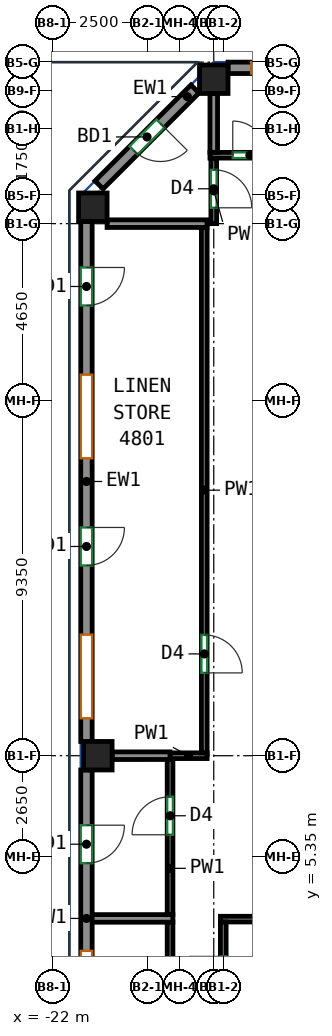
"""IFC4 building model, lengths in metres.
Left out: names, types, materials, properties, quantities, classifications, styles, units other than length and angle.
Written with IfcOpenShell. Run it as: python <this file> out.ifc"""

import sys

from ifc_helpers import new_model, si_unit, direction, frame, frame_2d, origin, origin_2d, place, context, subcontext, project, spatial, rectangle, extrude, source, transform, mapped, element, fill, save


model = new_model("IFC4")
c1 = context("Model", 3, precision=1e-05, world=origin(), true_north=direction((0.0, 1.0)))
c2 = subcontext(c1, "Body", "Model", "MODEL_VIEW")
j1 = project(units=[si_unit("LENGTHUNIT", "METRE"), si_unit("PLANEANGLEUNIT", "RADIAN")], contexts=[c1])
p1 = place(None, origin())
s1 = spatial("IfcSite", under=j1, at=p1, CompositionType="ELEMENT")
p2 = place(p1, origin())
s2 = spatial("IfcBuilding", under=s1, at=p2, CompositionType="ELEMENT")
p3 = place(p2, frame((0.0, 0.0, 199.9)))
s3 = spatial("IfcBuildingStorey", under=s2, at=p3, CompositionType="ELEMENT", Elevation=199.9)
m1 = source(origin(), c2, "Body", "SweptSolid", [
    extrude(rectangle(XDim=0.75, YDim=0.75, at=origin_2d()), origin(), (0.0, 0.0, 1.0), 3.12),
])
for number, where, z_axis, x_axis in (
    (1, (-20.932, 22.432, 0.0), (0.0, 0.0, 1.0), (1.0, 0.0, 0.0)),
    (2, (-20.8, 8.0, 0.0), (0.0, 0.0, 1.0), (1.0, 0.0, 0.0)),
    (3, (-17.75, 25.8, 0.0), (0.0, 0.0, 1.0), (1.0, 0.0, 0.0)),
):
    element("IfcColumn", number, at=place(p3, frame(where, z_axis=z_axis, x_axis=x_axis)), inside=s3, PredefinedType="COLUMN", context=c2, shape_type="MappedRepresentation", body=[
        mapped(m1, transform((0.0, 0.0, 0.0))),
    ])
m2 = source(origin(), c2, "Body", "SweptSolid", [
    extrude(rectangle(XDim=6.833, YDim=0.3, at=frame_2d((3.417, 0.0))), origin(), (0.0, 0.0, 1.0), 3.12),
])
p4 = place(p3, frame((-10.542, 26.1, 0.0), z_axis=(0.0, 0.0, 1.0), x_axis=(-1.0, 0.0, 0.0)))
e4 = element("IfcWall", 4, at=p4, inside=s3, PredefinedType="SOLIDWALL", context=c2, shape_type="MappedRepresentation", body=[
    mapped(m2, transform((0.0, 0.0, 0.0))),
])
p5 = place(p4, frame((0.608, 0.0, 0.85)))
e5 = element("IfcOpeningElement", 5, at=p5, cuts=e4, PredefinedType="OPENING", context=c2, shape_type="SweptSolid", body=[
    extrude(rectangle(XDim=2.2, YDim=1.95, at=frame_2d((1.1, 0.975))), frame((0.0, 0.16, 0.0), z_axis=(0.0, -1.0, 0.0), x_axis=(1.0, 0.0, 0.0)), (0.0, 0.0, 1.0), 0.32),
])
p6 = place(p4, frame((4.025, 0.0, 0.85)))
e6 = element("IfcOpeningElement", 6, at=p6, cuts=e4, PredefinedType="OPENING", context=c2, shape_type="SweptSolid", body=[
    extrude(rectangle(XDim=2.2, YDim=1.95, at=frame_2d((1.1, 0.975))), frame((0.0, 0.16, 0.0), z_axis=(0.0, -1.0, 0.0), x_axis=(1.0, 0.0, 0.0)), (0.0, 0.0, 1.0), 0.32),
])
m3 = source(origin(), c2, "Body", "SweptSolid", [
    extrude(rectangle(XDim=3.571, YDim=0.3, at=frame_2d((1.786, 0.0))), origin(), (0.0, 0.0, 1.0), 3.12),
])
p7 = place(p3, frame((-18.244, 25.544, 0.0), z_axis=(0.0, 0.0, 1.0), x_axis=(-0.707072595841, -0.707140964879, 0.0)))
e7 = element("IfcWall", 7, at=p7, inside=s3, PredefinedType="SOLIDWALL", context=c2, shape_type="MappedRepresentation", body=[
    mapped(m3, transform((0.0, 0.0, 0.0))),
])
p8 = place(p7, frame((1.285, 0.0, 0.0)))
e8 = element("IfcOpeningElement", 8, at=p8, cuts=e7, PredefinedType="OPENING", context=c2, shape_type="SweptSolid", body=[
    extrude(rectangle(XDim=1.0, YDim=2.1, at=frame_2d((0.5, 1.05))), frame((0.0, 0.16, 0.0), z_axis=(0.0, -1.0, 0.0), x_axis=(1.0, 0.0, 0.0)), (0.0, 0.0, 1.0), 0.32),
])
m4 = source(origin(), c2, "Body", "SweptSolid", [
    extrude(rectangle(XDim=13.682, YDim=0.3, at=frame_2d((6.841, 0.0))), origin(), (0.0, 0.0, 1.0), 3.12),
])
p9 = place(p3, frame((-21.1, 22.057, 0.0), z_axis=(0.0, 0.0, 1.0), x_axis=(0.0, -1.0, 0.0)))
e9 = element("IfcWall", 9, at=p9, inside=s3, PredefinedType="SOLIDWALL", context=c2, shape_type="MappedRepresentation", body=[
    mapped(m4, transform((0.0, 0.0, 0.0))),
])
p10 = place(p9, frame((1.21, 0.0, 0.0)))
e10 = element("IfcOpeningElement", 10, at=p10, cuts=e9, PredefinedType="OPENING", context=c2, shape_type="SweptSolid", body=[
    extrude(rectangle(XDim=1.0, YDim=2.1, at=frame_2d((0.5, 1.05))), frame((0.0, 0.16, 0.0), z_axis=(0.0, -1.0, 0.0), x_axis=(1.0, 0.0, 0.0)), (0.0, 0.0, 1.0), 0.32),
])
p11 = place(p9, frame((4.031, 0.0, 0.85)))
e11 = element("IfcOpeningElement", 11, at=p11, cuts=e9, PredefinedType="OPENING", context=c2, shape_type="SweptSolid", body=[
    extrude(rectangle(XDim=2.2, YDim=1.95, at=frame_2d((1.1, 0.975))), frame((0.0, 0.16, 0.0), z_axis=(0.0, -1.0, 0.0), x_axis=(1.0, 0.0, 0.0)), (0.0, 0.0, 1.0), 0.32),
])
p12 = place(p9, frame((8.051, 0.0, 0.0)))
e12 = element("IfcOpeningElement", 12, at=p12, cuts=e9, PredefinedType="OPENING", context=c2, shape_type="SweptSolid", body=[
    extrude(rectangle(XDim=1.0, YDim=2.1, at=frame_2d((0.5, 1.05))), frame((0.0, 0.16, 0.0), z_axis=(0.0, -1.0, 0.0), x_axis=(1.0, 0.0, 0.0)), (0.0, 0.0, 1.0), 0.32),
])
p13 = place(p9, frame((10.872, 0.0, 0.85)))
e13 = element("IfcOpeningElement", 13, at=p13, cuts=e9, PredefinedType="OPENING", context=c2, shape_type="SweptSolid", body=[
    extrude(rectangle(XDim=2.2, YDim=1.95, at=frame_2d((1.1, 0.975))), frame((0.0, 0.16, 0.0), z_axis=(0.0, -1.0, 0.0), x_axis=(1.0, 0.0, 0.0)), (0.0, 0.0, 1.0), 0.32),
])
m5 = source(origin(), c2, "Body", "SweptSolid", [
    extrude(rectangle(XDim=7.812, YDim=0.3, at=frame_2d((3.906, 0.0))), origin(), (0.0, 0.0, 1.0), 3.12),
])
p14 = place(p3, frame((-21.1, 7.625, 0.0), z_axis=(0.0, 0.0, 1.0), x_axis=(0.0, -1.0, 0.0)))
e14 = element("IfcWall", 14, at=p14, inside=s3, PredefinedType="SOLIDWALL", context=c2, shape_type="MappedRepresentation", body=[
    mapped(m5, transform((0.0, 0.0, 0.0))),
])
p15 = place(p14, frame((1.453, 0.0, 0.0)))
e15 = element("IfcOpeningElement", 15, at=p15, cuts=e14, PredefinedType="OPENING", context=c2, shape_type="SweptSolid", body=[
    extrude(rectangle(XDim=1.0, YDim=2.1, at=frame_2d((0.5, 1.05))), frame((0.0, 0.16, 0.0), z_axis=(0.0, -1.0, 0.0), x_axis=(1.0, 0.0, 0.0)), (0.0, 0.0, 1.0), 0.32),
])
p16 = place(p14, frame((4.759, 0.0, 0.85)))
e16 = element("IfcOpeningElement", 16, at=p16, cuts=e14, PredefinedType="OPENING", context=c2, shape_type="SweptSolid", body=[
    extrude(rectangle(XDim=2.2, YDim=1.95, at=frame_2d((1.1, 0.975))), frame((0.0, 0.16, 0.0), z_axis=(0.0, -1.0, 0.0), x_axis=(1.0, 0.0, 0.0)), (0.0, 0.0, 1.0), 0.32),
])
p17 = place(p3, frame((-17.925, 8.0, 0.0), z_axis=(0.0, 0.0, 1.0), x_axis=(-1.0, 0.0, 0.0)))
e17 = element("IfcWall", 17, at=p17, inside=s3, PredefinedType="PARTITIONING", context=c2, shape_type="SweptSolid", body=[
    extrude(rectangle(XDim=0.976, YDim=0.15, at=frame_2d((0.488, 0.0))), origin(), (0.0, 0.0, 1.0), 3.12),
])
p18 = place(p3, frame((-18.0, 21.9, 0.0), z_axis=(0.0, 0.0, 1.0), x_axis=(0.0, -1.0, 0.0)))
e18 = element("IfcWall", 18, at=p18, inside=s3, PredefinedType="PARTITIONING", context=c2, shape_type="SweptSolid", body=[
    extrude(rectangle(XDim=13.825, YDim=0.15, at=frame_2d((6.913, 0.0))), origin(), (0.0, 0.0, 1.0), 3.12),
])
p19 = place(p18, frame((10.721, 0.0, 0.0)))
e19 = element("IfcOpeningElement", 19, at=p19, cuts=e18, PredefinedType="OPENING", context=c2, shape_type="SweptSolid", body=[
    extrude(rectangle(XDim=1.0, YDim=2.1, at=frame_2d((0.5, 1.05))), frame((0.0, 0.085, 0.0), z_axis=(0.0, -1.0, 0.0), x_axis=(1.0, 0.0, 0.0)), (0.0, 0.0, 1.0), 0.17),
])
p20 = place(p3, frame((-18.9, -0.472, 0.0), z_axis=(0.0, 0.0, 1.0), x_axis=(0.0, 1.0, 0.0)))
e20 = element("IfcWall", 20, at=p20, inside=s3, PredefinedType="PARTITIONING", context=c2, shape_type="SweptSolid", body=[
    extrude(rectangle(XDim=4.101, YDim=0.15, at=frame_2d((2.05, 0.0))), origin(), (0.0, 0.0, 1.0), 3.12),
])
p21 = place(p20, frame((2.001, 0.0, 0.0)))
e21 = element("IfcOpeningElement", 21, at=p21, cuts=e20, PredefinedType="OPENING", context=c2, shape_type="SweptSolid", body=[
    extrude(rectangle(XDim=1.0, YDim=2.1, at=frame_2d((0.5, 1.05))), frame((0.0, 0.085, 0.0), z_axis=(0.0, -1.0, 0.0), x_axis=(1.0, 0.0, 0.0)), (0.0, 0.0, 1.0), 0.17),
])
p22 = place(p3, frame((-18.9, 3.809, 0.0), z_axis=(0.0, 0.0, 1.0), x_axis=(0.0, 1.0, 0.0)))
e22 = element("IfcWall", 22, at=p22, inside=s3, PredefinedType="PARTITIONING", context=c2, shape_type="SweptSolid", body=[
    extrude(rectangle(XDim=4.092, YDim=0.15, at=frame_2d((2.046, 0.0))), origin(), (0.0, 0.0, 1.0), 3.12),
])
p23 = place(p22, frame((2.111, 0.0, 0.0)))
e23 = element("IfcOpeningElement", 23, at=p23, cuts=e22, PredefinedType="OPENING", context=c2, shape_type="SweptSolid", body=[
    extrude(rectangle(XDim=1.0, YDim=2.1, at=frame_2d((0.5, 1.05))), frame((0.0, 0.085, 0.0), z_axis=(0.0, -1.0, 0.0), x_axis=(1.0, 0.0, 0.0)), (0.0, 0.0, 1.0), 0.17),
])
p24 = place(p3, frame((-17.75, 23.725, 0.0), z_axis=(0.0, 0.0, 1.0), x_axis=(0.0, -1.0, 0.0)))
e24 = element("IfcWall", 24, at=p24, inside=s3, PredefinedType="PARTITIONING", context=c2, shape_type="SweptSolid", body=[
    extrude(rectangle(XDim=1.725, YDim=0.15, at=frame_2d((0.863, 0.0))), origin(), (0.0, 0.0, 1.0), 3.12),
])
p25 = place(p24, frame((0.308, 0.0, 0.0)))
e25 = element("IfcOpeningElement", 25, at=p25, cuts=e24, PredefinedType="OPENING", context=c2, shape_type="SweptSolid", body=[
    extrude(rectangle(XDim=1.0, YDim=2.1, at=frame_2d((0.5, 1.05))), frame((0.0, 0.085, 0.0), z_axis=(0.0, -1.0, 0.0), x_axis=(1.0, 0.0, 0.0)), (0.0, 0.0, 1.0), 0.17),
])
p26 = place(p3, frame((-17.85, 23.8, 0.0), z_axis=(0.0, 0.0, 1.0), x_axis=(1.0, 0.0, 0.0)))
e26 = element("IfcWall", 26, at=p26, inside=s3, PredefinedType="PARTITIONING", context=c2, shape_type="SweptSolid", body=[
    extrude(rectangle(XDim=45.7, YDim=0.15, at=frame_2d((22.85, 0.0))), origin(), (0.0, 0.0, 1.0), 3.12),
])
p27 = place(p26, frame((0.6, 0.0, 0.0)))
e27 = element("IfcOpeningElement", 27, at=p27, cuts=e26, PredefinedType="OPENING", context=c2, shape_type="SweptSolid", body=[
    extrude(rectangle(XDim=0.9, YDim=2.1, at=frame_2d((0.45, 1.05))), frame((0.0, 0.085, 0.0), z_axis=(0.0, -1.0, 0.0), x_axis=(1.0, 0.0, 0.0)), (0.0, 0.0, 1.0), 0.17),
])
p28 = place(p26, frame((4.081, 0.0, 0.0)))
e28 = element("IfcOpeningElement", 28, at=p28, cuts=e26, PredefinedType="OPENING", context=c2, shape_type="SweptSolid", body=[
    extrude(rectangle(XDim=1.0, YDim=2.1, at=frame_2d((0.5, 1.05))), frame((0.0, 0.085, 0.0), z_axis=(0.0, -1.0, 0.0), x_axis=(1.0, 0.0, 0.0)), (0.0, 0.0, 1.0), 0.17),
])
p29 = place(p26, frame((9.481, 0.0, 0.0)))
e29 = element("IfcOpeningElement", 29, at=p29, cuts=e26, PredefinedType="OPENING", context=c2, shape_type="SweptSolid", body=[
    extrude(rectangle(XDim=0.9, YDim=2.1, at=frame_2d((0.45, 1.05))), frame((0.0, 0.085, 0.0), z_axis=(0.0, -1.0, 0.0), x_axis=(1.0, 0.0, 0.0)), (0.0, 0.0, 1.0), 0.17),
])
p30 = place(p26, frame((12.803, 0.0, 0.0)))
e30 = element("IfcOpeningElement", 30, at=p30, cuts=e26, PredefinedType="OPENING", context=c2, shape_type="SweptSolid", body=[
    extrude(rectangle(XDim=1.0, YDim=2.1, at=frame_2d((0.5, 1.05))), frame((0.0, 0.085, 0.0), z_axis=(0.0, -1.0, 0.0), x_axis=(1.0, 0.0, 0.0)), (0.0, 0.0, 1.0), 0.17),
])
p31 = place(p26, frame((15.489, 0.0, 0.0)))
e31 = element("IfcOpeningElement", 31, at=p31, cuts=e26, PredefinedType="OPENING", context=c2, shape_type="SweptSolid", body=[
    extrude(rectangle(XDim=0.9, YDim=2.1, at=frame_2d((0.45, 1.05))), frame((0.0, 0.085, 0.0), z_axis=(0.0, -1.0, 0.0), x_axis=(1.0, 0.0, 0.0)), (0.0, 0.0, 1.0), 0.17),
])
p32 = place(p26, frame((21.244, 0.0, 0.0)))
e32 = element("IfcOpeningElement", 32, at=p32, cuts=e26, PredefinedType="OPENING", context=c2, shape_type="SweptSolid", body=[
    extrude(rectangle(XDim=0.9, YDim=2.1, at=frame_2d((0.45, 1.05))), frame((0.0, 0.085, 0.0), z_axis=(0.0, -1.0, 0.0), x_axis=(1.0, 0.0, 0.0)), (0.0, 0.0, 1.0), 0.17),
])
p33 = place(p26, frame((23.542, 0.0, 0.0)))
e33 = element("IfcOpeningElement", 33, at=p33, cuts=e26, PredefinedType="OPENING", context=c2, shape_type="SweptSolid", body=[
    extrude(rectangle(XDim=1.0, YDim=2.1, at=frame_2d((0.5, 1.05))), frame((0.0, 0.085, 0.0), z_axis=(0.0, -1.0, 0.0), x_axis=(1.0, 0.0, 0.0)), (0.0, 0.0, 1.0), 0.17),
])
p34 = place(p26, frame((28.841, 0.0, 0.0)))
e34 = element("IfcOpeningElement", 34, at=p34, cuts=e26, PredefinedType="OPENING", context=c2, shape_type="SweptSolid", body=[
    extrude(rectangle(XDim=0.9, YDim=2.1, at=frame_2d((0.45, 1.05))), frame((0.0, 0.085, 0.0), z_axis=(0.0, -1.0, 0.0), x_axis=(1.0, 0.0, 0.0)), (0.0, 0.0, 1.0), 0.17),
])
p35 = place(p26, frame((32.331, 0.0, 0.0)))
e35 = element("IfcOpeningElement", 35, at=p35, cuts=e26, PredefinedType="OPENING", context=c2, shape_type="SweptSolid", body=[
    extrude(rectangle(XDim=1.0, YDim=2.1, at=frame_2d((0.5, 1.05))), frame((0.0, 0.085, 0.0), z_axis=(0.0, -1.0, 0.0), x_axis=(1.0, 0.0, 0.0)), (0.0, 0.0, 1.0), 0.17),
])
p36 = place(p26, frame((35.42, 0.0, 0.0)))
e36 = element("IfcOpeningElement", 36, at=p36, cuts=e26, PredefinedType="OPENING", context=c2, shape_type="SweptSolid", body=[
    extrude(rectangle(XDim=0.9, YDim=2.1, at=frame_2d((0.45, 1.05))), frame((0.0, 0.085, 0.0), z_axis=(0.0, -1.0, 0.0), x_axis=(1.0, 0.0, 0.0)), (0.0, 0.0, 1.0), 0.17),
])
p37 = place(p26, frame((40.317, 0.0, 0.0)))
e37 = element("IfcOpeningElement", 37, at=p37, cuts=e26, PredefinedType="OPENING", context=c2, shape_type="SweptSolid", body=[
    extrude(rectangle(XDim=0.9, YDim=2.1, at=frame_2d((0.45, 1.05))), frame((0.0, 0.085, 0.0), z_axis=(0.0, -1.0, 0.0), x_axis=(1.0, 0.0, 0.0)), (0.0, 0.0, 1.0), 0.17),
])
p38 = place(p26, frame((43.199, 0.0, 0.0)))
e38 = element("IfcOpeningElement", 38, at=p38, cuts=e26, PredefinedType="OPENING", context=c2, shape_type="SweptSolid", body=[
    extrude(rectangle(XDim=1.0, YDim=2.1, at=frame_2d((0.5, 1.05))), frame((0.0, 0.085, 0.0), z_axis=(0.0, -1.0, 0.0), x_axis=(1.0, 0.0, 0.0)), (0.0, 0.0, 1.0), 0.17),
])
p39 = place(p3, frame((-17.575, 3.7, 0.0), z_axis=(0.0, 0.0, 1.0), x_axis=(1.0, 0.0, 0.0)))
e39 = element("IfcWall", 39, at=p39, inside=s3, PredefinedType="PARTITIONING", context=c2, shape_type="SweptSolid", body=[
    extrude(rectangle(XDim=33.85, YDim=0.15, at=frame_2d((16.925, 0.0))), origin(), (0.0, 0.0, 1.0), 3.12),
])
p40 = place(p39, frame((10.0, 0.0, 0.0)))
e40 = element("IfcOpeningElement", 40, at=p40, cuts=e39, PredefinedType="OPENING", context=c2, shape_type="SweptSolid", body=[
    extrude(rectangle(XDim=0.9, YDim=2.1, at=frame_2d((0.45, 1.05))), frame((0.0, 0.085, 0.0), z_axis=(0.0, -1.0, 0.0), x_axis=(1.0, 0.0, 0.0)), (0.0, 0.0, 1.0), 0.17),
])
p41 = place(p39, frame((15.182, 0.0, 0.0)))
e41 = element("IfcOpeningElement", 41, at=p41, cuts=e39, PredefinedType="OPENING", context=c2, shape_type="SweptSolid", body=[
    extrude(rectangle(XDim=0.9, YDim=2.1, at=frame_2d((0.45, 1.05))), frame((0.0, 0.085, 0.0), z_axis=(0.0, -1.0, 0.0), x_axis=(1.0, 0.0, 0.0)), (0.0, 0.0, 1.0), 0.17),
])
p42 = place(p39, frame((26.367, 0.0, 0.0)))
e42 = element("IfcOpeningElement", 42, at=p42, cuts=e39, PredefinedType="OPENING", context=c2, shape_type="SweptSolid", body=[
    extrude(rectangle(XDim=0.9, YDim=2.1, at=frame_2d((0.45, 1.05))), frame((0.0, 0.085, 0.0), z_axis=(0.0, -1.0, 0.0), x_axis=(1.0, 0.0, 0.0)), (0.0, 0.0, 1.0), 0.17),
])
p43 = place(p3, frame((-17.5, -4.725, 0.0), z_axis=(0.0, 0.0, 1.0), x_axis=(0.0, 1.0, 0.0)))
e43 = element("IfcWall", 43, at=p43, inside=s3, PredefinedType="PARTITIONING", context=c2, shape_type="SweptSolid", body=[
    extrude(rectangle(XDim=8.35, YDim=0.15, at=frame_2d((4.175, 0.0))), origin(), (0.0, 0.0, 1.0), 3.12),
])
p44 = place(p43, frame((6.545, 0.0, 0.0)))
e44 = element("IfcOpeningElement", 44, at=p44, cuts=e43, PredefinedType="OPENING", context=c2, shape_type="SweptSolid", body=[
    extrude(rectangle(XDim=0.9, YDim=2.1, at=frame_2d((0.45, 1.05))), frame((0.0, 0.085, 0.0), z_axis=(0.0, -1.0, 0.0), x_axis=(1.0, 0.0, 0.0)), (0.0, 0.0, 1.0), 0.17),
])
p45 = place(p3, frame((-20.425, 8.0, 0.0), z_axis=(0.0, 0.0, 1.0), x_axis=(0.999999794741, 0.000640717472, 0.0)))
e45 = element("IfcWall", 45, at=p45, inside=s3, PredefinedType="PARTITIONING", context=c2, shape_type="SweptSolid", body=[
    extrude(rectangle(XDim=1.524, YDim=0.2, at=frame_2d((0.762, 0.0))), origin(), (0.0, 0.0, 1.0), 3.12),
])
p46 = place(p3, frame((-17.927, 22.0, 0.0), z_axis=(0.0, 0.0, 1.0), x_axis=(-1.0, 0.0, 0.0)))
e46 = element("IfcWall", 46, at=p46, inside=s3, PredefinedType="PARTITIONING", context=c2, shape_type="SweptSolid", body=[
    extrude(rectangle(XDim=2.63, YDim=0.2, at=frame_2d((1.315, 0.0))), origin(), (0.0, 0.0, 1.0), 3.12),
])
p47 = place(p3, frame((-21.0, 3.719, 0.0), z_axis=(0.0, 0.0, 1.0), x_axis=(1.0, 0.0, 0.0)))
e47 = element("IfcWall", 47, at=p47, inside=s3, PredefinedType="PARTITIONING", context=c2, shape_type="SweptSolid", body=[
    extrude(rectangle(XDim=2.173, YDim=0.2, at=frame_2d((1.086, 0.0))), origin(), (0.0, 0.0, 1.0), 3.12),
])
p48 = place(p3, frame((-17.75, 23.877, 0.0), z_axis=(0.0, 0.0, 1.0), x_axis=(0.0, 1.0, 0.0)))
e48 = element("IfcWall", 48, at=p48, inside=s3, PredefinedType="PARTITIONING", context=c2, shape_type="SweptSolid", body=[
    extrude(rectangle(XDim=1.548, YDim=0.2, at=frame_2d((0.774, 0.0))), origin(), (0.0, 0.0, 1.0), 3.12),
])
p49 = place(p6, origin())
e49 = element("IfcWindow", 49, at=p49, inside=s3, PartitioningType="SINGLE_PANEL", PredefinedType="WINDOW", context=c2, shape_type="SweptSolid", body=[
    extrude(rectangle(XDim=2.2, YDim=1.95, at=frame_2d((1.1, 0.975))), frame((0.0, 0.03, 0.0), z_axis=(0.0, -1.0, 0.0), x_axis=(1.0, 0.0, 0.0)), (0.0, 0.0, 1.0), 0.06),
])
fill(e6, e49)
p50 = place(p8, origin())
e50 = element("IfcDoor", 50, at=p50, inside=s3, OperationType="SINGLE_SWING_LEFT", PredefinedType="DOOR", context=c2, shape_type="SweptSolid", body=[
    extrude(rectangle(XDim=1.0, YDim=2.1, at=frame_2d((0.5, 1.05))), frame((0.0, 0.025, 0.0), z_axis=(0.0, -1.0, 0.0), x_axis=(1.0, 0.0, 0.0)), (0.0, 0.0, 1.0), 0.05),
])
fill(e8, e50)
p51 = place(p10, origin())
e51 = element("IfcDoor", 51, at=p51, inside=s3, OperationType="SINGLE_SWING_LEFT", PredefinedType="DOOR", context=c2, shape_type="SweptSolid", body=[
    extrude(rectangle(XDim=1.0, YDim=2.1, at=frame_2d((0.5, 1.05))), frame((0.0, 0.025, 0.0), z_axis=(0.0, -1.0, 0.0), x_axis=(1.0, 0.0, 0.0)), (0.0, 0.0, 1.0), 0.05),
])
fill(e10, e51)
p52 = place(p11, origin())
e52 = element("IfcWindow", 52, at=p52, inside=s3, PartitioningType="SINGLE_PANEL", PredefinedType="WINDOW", context=c2, shape_type="SweptSolid", body=[
    extrude(rectangle(XDim=2.2, YDim=1.95, at=frame_2d((1.1, 0.975))), frame((0.0, 0.03, 0.0), z_axis=(0.0, -1.0, 0.0), x_axis=(1.0, 0.0, 0.0)), (0.0, 0.0, 1.0), 0.06),
])
fill(e11, e52)
p53 = place(p12, origin())
e53 = element("IfcDoor", 53, at=p53, inside=s3, OperationType="SINGLE_SWING_LEFT", PredefinedType="DOOR", context=c2, shape_type="SweptSolid", body=[
    extrude(rectangle(XDim=1.0, YDim=2.1, at=frame_2d((0.5, 1.05))), frame((0.0, 0.025, 0.0), z_axis=(0.0, -1.0, 0.0), x_axis=(1.0, 0.0, 0.0)), (0.0, 0.0, 1.0), 0.05),
])
fill(e12, e53)
p54 = place(p13, origin())
e54 = element("IfcWindow", 54, at=p54, inside=s3, PartitioningType="SINGLE_PANEL", PredefinedType="WINDOW", context=c2, shape_type="SweptSolid", body=[
    extrude(rectangle(XDim=2.2, YDim=1.95, at=frame_2d((1.1, 0.975))), frame((0.0, 0.03, 0.0), z_axis=(0.0, -1.0, 0.0), x_axis=(1.0, 0.0, 0.0)), (0.0, 0.0, 1.0), 0.06),
])
fill(e13, e54)
p55 = place(p15, origin())
e55 = element("IfcDoor", 55, at=p55, inside=s3, OperationType="SINGLE_SWING_LEFT", PredefinedType="DOOR", context=c2, shape_type="SweptSolid", body=[
    extrude(rectangle(XDim=1.0, YDim=2.1, at=frame_2d((0.5, 1.05))), frame((0.0, 0.025, 0.0), z_axis=(0.0, -1.0, 0.0), x_axis=(1.0, 0.0, 0.0)), (0.0, 0.0, 1.0), 0.05),
])
fill(e15, e55)
p56 = place(p16, origin())
e56 = element("IfcWindow", 56, at=p56, inside=s3, PartitioningType="SINGLE_PANEL", PredefinedType="WINDOW", context=c2, shape_type="SweptSolid", body=[
    extrude(rectangle(XDim=2.2, YDim=1.95, at=frame_2d((1.1, 0.975))), frame((0.0, 0.03, 0.0), z_axis=(0.0, -1.0, 0.0), x_axis=(1.0, 0.0, 0.0)), (0.0, 0.0, 1.0), 0.06),
])
fill(e16, e56)
p57 = place(p44, origin())
e57 = element("IfcDoor", 57, at=p57, inside=s3, OperationType="SINGLE_SWING_RIGHT", PredefinedType="DOOR", context=c2, shape_type="SweptSolid", body=[
    extrude(rectangle(XDim=0.9, YDim=2.1, at=frame_2d((0.45, 1.05))), frame((0.0, 0.025, 0.0), z_axis=(0.0, -1.0, 0.0), x_axis=(1.0, 0.0, 0.0)), (0.0, 0.0, 1.0), 0.05),
])
fill(e44, e57)
p58 = place(p23, origin())
e58 = element("IfcDoor", 58, at=p58, inside=s3, OperationType="SINGLE_SWING_LEFT", PredefinedType="DOOR", context=c2, shape_type="SweptSolid", body=[
    extrude(rectangle(XDim=1.0, YDim=2.1, at=frame_2d((0.5, 1.05))), frame((0.0, 0.025, 0.0), z_axis=(0.0, -1.0, 0.0), x_axis=(1.0, 0.0, 0.0)), (0.0, 0.0, 1.0), 0.05),
])
fill(e23, e58)
p59 = place(p19, origin())
e59 = element("IfcDoor", 59, at=p59, inside=s3, OperationType="SINGLE_SWING_RIGHT", PredefinedType="DOOR", context=c2, shape_type="SweptSolid", body=[
    extrude(rectangle(XDim=1.0, YDim=2.1, at=frame_2d((0.5, 1.05))), frame((0.0, 0.025, 0.0), z_axis=(0.0, -1.0, 0.0), x_axis=(1.0, 0.0, 0.0)), (0.0, 0.0, 1.0), 0.05),
])
fill(e19, e59)
p60 = place(p25, origin())
e60 = element("IfcDoor", 60, at=p60, inside=s3, OperationType="SINGLE_SWING_RIGHT", PredefinedType="DOOR", context=c2, shape_type="SweptSolid", body=[
    extrude(rectangle(XDim=1.0, YDim=2.1, at=frame_2d((0.5, 1.05))), frame((0.0, 0.025, 0.0), z_axis=(0.0, -1.0, 0.0), x_axis=(1.0, 0.0, 0.0)), (0.0, 0.0, 1.0), 0.05),
])
fill(e25, e60)
p61 = place(p27, origin())
e61 = element("IfcDoor", 61, at=p61, inside=s3, OperationType="SINGLE_SWING_LEFT", PredefinedType="DOOR", context=c2, shape_type="SweptSolid", body=[
    extrude(rectangle(XDim=0.9, YDim=2.1, at=frame_2d((0.45, 1.05))), frame((0.0, 0.025, 0.0), z_axis=(0.0, -1.0, 0.0), x_axis=(1.0, 0.0, 0.0)), (0.0, 0.0, 1.0), 0.05),
])
fill(e27, e61)
save(model, sys.argv[1])
